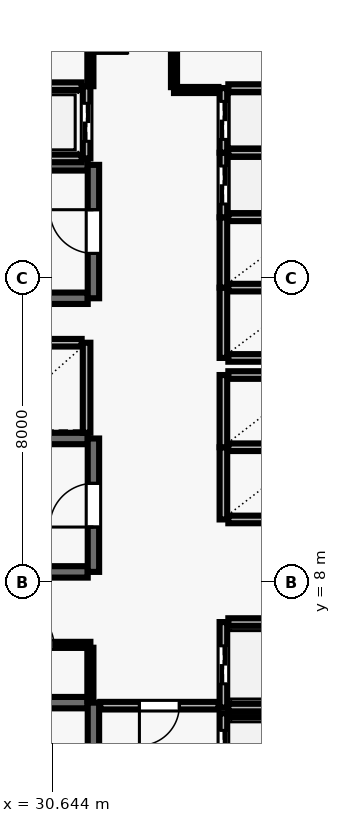
"""IFC4 building model, lengths in metres.
Left out: names, types, materials, properties, quantities, classifications, styles, units other than length and angle.
Written with IfcOpenShell. Run it as: python <this file> out.ifc"""

import sys

from ifc_helpers import new_model, si_unit, direction, frame, frame_2d, origin, place, context, subcontext, project, spatial, rectangle, extrude, element, fill, save


model = new_model("IFC4")
c1 = context("Model", 3, precision=1e-05, world=origin(), true_north=direction((0.0, 1.0)))
c2 = subcontext(c1, "Body", "Model", "MODEL_VIEW")
j1 = project(units=[si_unit("LENGTHUNIT", "METRE"), si_unit("PLANEANGLEUNIT", "RADIAN")], contexts=[c1])
p1 = place(None, origin())
s1 = spatial("IfcSite", under=j1, at=p1, CompositionType="ELEMENT")
p2 = place(p1, origin())
s2 = spatial("IfcBuilding", under=s1, at=p2, CompositionType="ELEMENT")
p3 = place(p2, frame((0.0, 0.0, 142.4)))
s3 = spatial("IfcBuildingStorey", under=s2, at=p3, CompositionType="ELEMENT", Elevation=142.4)
p4 = place(p3, frame((31.58, 4.83, 0.0), z_axis=(0.0, 0.0, 1.0), x_axis=(-1.0, 0.0, 0.0)))
e1 = element("IfcWall", 1, at=p4, inside=s3, PredefinedType="SHEAR", context=c2, shape_type="SweptSolid", body=[
    extrude(rectangle(XDim=8.36, YDim=0.3, at=frame_2d((4.18, 0.0))), origin(), (0.0, 0.0, 1.0), 3.69),
])
p5 = place(p3, frame((31.73, 0.96, 0.0), z_axis=(0.0, 0.0, 1.0), x_axis=(0.0, 1.0, 0.0)))
e2 = element("IfcWall", 2, at=p5, inside=s3, PredefinedType="SHEAR", context=c2, shape_type="SweptSolid", body=[
    extrude(rectangle(XDim=3.87, YDim=0.3, at=frame_2d((1.935, 0.0))), origin(), (0.0, 0.0, 1.0), 3.69),
])
p6 = place(p5, frame((1.54, 0.0, 0.0)))
e3 = element("IfcOpeningElement", 3, at=p6, cuts=e2, PredefinedType="OPENING", context=c2, shape_type="SweptSolid", body=[
    extrude(rectangle(XDim=1.15, YDim=2.15, at=frame_2d((0.575, 1.075))), frame((0.0, 0.16, 0.0), z_axis=(0.0, -1.0, 0.0), x_axis=(1.0, 0.0, 0.0)), (0.0, 0.0, 1.0), 0.32),
])
for number, where, z_axis, x_axis in (
    (4, (31.58, 18.98, 0.0), (0.0, 0.0, 1.0), (-1.0, 0.0, 0.0)),
    (5, (23.22, 15.47, 0.0), (0.0, 0.0, 1.0), (1.0, 0.0, 0.0)),
):
    element("IfcWall", number, at=place(p3, frame(where, z_axis=z_axis, x_axis=x_axis)), inside=s3, PredefinedType="SHEAR", context=c2, shape_type="SweptSolid", body=[
        extrude(rectangle(XDim=8.36, YDim=0.3, at=frame_2d((4.18, 0.0))), origin(), (0.0, 0.0, 1.0), 3.69),
    ])
p7 = place(p3, frame((31.73, 15.47, 0.0), z_axis=(0.0, 0.0, 1.0), x_axis=(0.0, 1.0, 0.0)))
e6 = element("IfcWall", 6, at=p7, inside=s3, PredefinedType="SHEAR", context=c2, shape_type="SweptSolid", body=[
    extrude(rectangle(XDim=3.51, YDim=0.3, at=frame_2d((1.755, 0.0))), origin(), (0.0, 0.0, 1.0), 3.69),
])
p8 = place(p7, frame((1.18, 0.0, 0.0)))
e7 = element("IfcOpeningElement", 7, at=p8, cuts=e6, PredefinedType="OPENING", context=c2, shape_type="SweptSolid", body=[
    extrude(rectangle(XDim=1.15, YDim=2.15, at=frame_2d((0.575, 1.075))), frame((0.0, 0.16, 0.0), z_axis=(0.0, -1.0, 0.0), x_axis=(1.0, 0.0, 0.0)), (0.0, 0.0, 1.0), 0.32),
])
for number, where, z_axis, x_axis in (
    (8, (31.58, 11.78, 0.0), (0.0, 0.0, 1.0), (-1.0, 0.0, 0.0)),
    (9, (23.22, 8.27, 0.0), (0.0, 0.0, 1.0), (1.0, 0.0, 0.0)),
):
    element("IfcWall", number, at=place(p3, frame(where, z_axis=z_axis, x_axis=x_axis)), inside=s3, PredefinedType="SHEAR", context=c2, shape_type="SweptSolid", body=[
        extrude(rectangle(XDim=8.36, YDim=0.3, at=frame_2d((4.18, 0.0))), origin(), (0.0, 0.0, 1.0), 3.69),
    ])
p9 = place(p3, frame((31.73, 8.27, 0.0), z_axis=(0.0, 0.0, 1.0), x_axis=(0.0, 1.0, 0.0)))
e10 = element("IfcWall", 10, at=p9, inside=s3, PredefinedType="SHEAR", context=c2, shape_type="SweptSolid", body=[
    extrude(rectangle(XDim=3.51, YDim=0.3, at=frame_2d((1.755, 0.0))), origin(), (0.0, 0.0, 1.0), 3.69),
])
p10 = place(p9, frame((1.18, 0.0, 0.0)))
e11 = element("IfcOpeningElement", 11, at=p10, cuts=e10, PredefinedType="OPENING", context=c2, shape_type="SweptSolid", body=[
    extrude(rectangle(XDim=1.15, YDim=2.15, at=frame_2d((0.575, 1.075))), frame((0.0, 0.16, 0.0), z_axis=(0.0, -1.0, 0.0), x_axis=(1.0, 0.0, 0.0)), (0.0, 0.0, 1.0), 0.32),
])
p11 = place(p3, frame((35.15, 4.55, 0.0), z_axis=(0.0, 0.0, 1.0), x_axis=(0.0, -1.0, 0.0)))
e12 = element("IfcWall", 12, at=p11, inside=s3, PredefinedType="SOLIDWALL", context=c2, shape_type="SweptSolid", body=[
    extrude(rectangle(XDim=2.1, YDim=0.2, at=frame_2d((1.05, 0.0))), origin(), (0.0, 0.0, 1.0), 3.69),
])
p12 = place(p11, frame((0.45, 0.0, 0.0)))
e13 = element("IfcOpeningElement", 13, at=p12, cuts=e12, PredefinedType="OPENING", context=c2, shape_type="SweptSolid", body=[
    extrude(rectangle(XDim=1.2, YDim=2.15, at=frame_2d((0.6, 1.075))), frame((0.0, 0.11, 0.0), z_axis=(0.0, -1.0, 0.0), x_axis=(1.0, 0.0, 0.0)), (0.0, 0.0, 1.0), 0.22),
])
p13 = place(p3, frame((37.42, 4.55, 0.0), z_axis=(0.0, 0.0, 1.0), x_axis=(-1.0, 0.0, 0.0)))
e14 = element("IfcWall", 14, at=p13, inside=s3, PredefinedType="SOLIDWALL", context=c2, shape_type="SweptSolid", body=[
    extrude(rectangle(XDim=2.14, YDim=0.2, at=frame_2d((1.07, 0.0))), origin(), (0.0, 0.0, 1.0), 3.69),
])
p14 = place(p3, frame((35.15, 6.95, 0.0), z_axis=(0.0, 0.0, 1.0), x_axis=(0.0, -1.0, 0.0)))
e15 = element("IfcWall", 15, at=p14, inside=s3, PredefinedType="SOLIDWALL", context=c2, shape_type="SweptSolid", body=[
    extrude(rectangle(XDim=2.25, YDim=0.2, at=frame_2d((1.125, 0.0))), origin(), (0.0, 0.0, 1.0), 3.69),
])
p15 = place(p14, frame((0.625, 0.0, 0.0)))
e16 = element("IfcOpeningElement", 16, at=p15, cuts=e15, PredefinedType="OPENING", context=c2, shape_type="SweptSolid", body=[
    extrude(rectangle(XDim=1.0, YDim=2.1, at=frame_2d((0.5, 1.05))), frame((0.0, 0.11, 0.0), z_axis=(0.0, -1.0, 0.0), x_axis=(1.0, 0.0, 0.0)), (0.0, 0.0, 1.0), 0.22),
])
for number, where, z_axis, x_axis in (
    (17, (35.28, 4.7, 0.0), (0.0, 0.0, 1.0), (1.0, 0.0, 0.0)),
    (18, (37.42, 6.95, 0.0), (0.0, 0.0, 1.0), (-1.0, 0.0, 0.0)),
):
    element("IfcWall", number, at=place(p3, frame(where, z_axis=z_axis, x_axis=x_axis)), inside=s3, PredefinedType="SOLIDWALL", context=c2, shape_type="SweptSolid", body=[
        extrude(rectangle(XDim=2.14, YDim=0.2, at=frame_2d((1.07, 0.0))), origin(), (0.0, 0.0, 1.0), 3.69),
    ])
p16 = place(p3, frame((35.15, 11.55, 0.0), z_axis=(0.0, 0.0, 1.0), x_axis=(0.0, -1.0, 0.0)))
e19 = element("IfcWall", 19, at=p16, inside=s3, PredefinedType="SOLIDWALL", context=c2, shape_type="SweptSolid", body=[
    extrude(rectangle(XDim=1.9, YDim=0.2, at=frame_2d((0.95, 0.0))), origin(), (0.0, 0.0, 1.0), 3.69),
])
for number, where, z_axis, x_axis in (
    (20, (35.28, 9.65, 0.0), (0.0, 0.0, 1.0), (1.0, 0.0, 0.0)),
    (21, (37.42, 11.55, 0.0), (0.0, 0.0, 1.0), (-1.0, 0.0, 0.0)),
):
    element("IfcWall", number, at=place(p3, frame(where, z_axis=z_axis, x_axis=x_axis)), inside=s3, PredefinedType="SOLIDWALL", context=c2, shape_type="SweptSolid", body=[
        extrude(rectangle(XDim=2.14, YDim=0.2, at=frame_2d((1.07, 0.0))), origin(), (0.0, 0.0, 1.0), 3.69),
    ])
p17 = place(p3, frame((35.15, 13.45, 0.0), z_axis=(0.0, 0.0, 1.0), x_axis=(0.0, -1.0, 0.0)))
e22 = element("IfcWall", 22, at=p17, inside=s3, PredefinedType="SOLIDWALL", context=c2, shape_type="SweptSolid", body=[
    extrude(rectangle(XDim=1.9, YDim=0.2, at=frame_2d((0.95, 0.0))), origin(), (0.0, 0.0, 1.0), 3.69),
])
p18 = place(p3, frame((37.42, 13.45, 0.0), z_axis=(0.0, 0.0, 1.0), x_axis=(-1.0, 0.0, 0.0)))
e23 = element("IfcWall", 23, at=p18, inside=s3, PredefinedType="SOLIDWALL", context=c2, shape_type="SweptSolid", body=[
    extrude(rectangle(XDim=2.14, YDim=0.2, at=frame_2d((1.07, 0.0))), origin(), (0.0, 0.0, 1.0), 3.69),
])
p19 = place(p3, frame((31.55, 11.93, 0.0), z_axis=(0.0, 0.0, 1.0), x_axis=(0.0, 1.0, 0.0)))
e24 = element("IfcWall", 24, at=p19, inside=s3, PredefinedType="SOLIDWALL", context=c2, shape_type="SweptSolid", body=[
    extrude(rectangle(XDim=2.37, YDim=0.2, at=frame_2d((1.185, 0.0))), origin(), (0.0, 0.0, 1.0), 3.69),
])
p20 = place(p3, frame((31.42, 14.3, 0.0), z_axis=(0.0, 0.0, 1.0), x_axis=(-1.0, 0.0, 0.0)))
e25 = element("IfcWall", 25, at=p20, inside=s3, PredefinedType="SOLIDWALL", context=c2, shape_type="SweptSolid", body=[
    extrude(rectangle(XDim=2.44, YDim=0.2, at=frame_2d((1.22, 0.0))), origin(), (0.0, 0.0, 1.0), 3.69),
])
p21 = place(p3, frame((35.15, 15.75, 0.0), z_axis=(0.0, 0.0, 1.0), x_axis=(0.0, -1.0, 0.0)))
e26 = element("IfcWall", 26, at=p21, inside=s3, PredefinedType="SOLIDWALL", context=c2, shape_type="SweptSolid", body=[
    extrude(rectangle(XDim=1.85, YDim=0.2, at=frame_2d((0.925, 0.0))), origin(), (0.0, 0.0, 1.0), 3.69),
])
for number, where, z_axis, x_axis in (
    (27, (35.28, 13.9, 0.0), (0.0, 0.0, 1.0), (1.0, 0.0, 0.0)),
    (28, (37.42, 15.75, 0.0), (0.0, 0.0, 1.0), (-1.0, 0.0, 0.0)),
):
    element("IfcWall", number, at=place(p3, frame(where, z_axis=z_axis, x_axis=x_axis)), inside=s3, PredefinedType="SOLIDWALL", context=c2, shape_type="SweptSolid", body=[
        extrude(rectangle(XDim=2.14, YDim=0.2, at=frame_2d((1.07, 0.0))), origin(), (0.0, 0.0, 1.0), 3.69),
    ])
p22 = place(p3, frame((35.15, 17.6, 0.0), z_axis=(0.0, 0.0, 1.0), x_axis=(0.0, -1.0, 0.0)))
e29 = element("IfcWall", 29, at=p22, inside=s3, PredefinedType="SOLIDWALL", context=c2, shape_type="SweptSolid", body=[
    extrude(rectangle(XDim=1.85, YDim=0.2, at=frame_2d((0.925, 0.0))), origin(), (0.0, 0.0, 1.0), 3.69),
])
p23 = place(p3, frame((37.42, 17.6, 0.0), z_axis=(0.0, 0.0, 1.0), x_axis=(-1.0, 0.0, 0.0)))
e30 = element("IfcWall", 30, at=p23, inside=s3, PredefinedType="SOLIDWALL", context=c2, shape_type="SweptSolid", body=[
    extrude(rectangle(XDim=2.14, YDim=0.2, at=frame_2d((1.07, 0.0))), origin(), (0.0, 0.0, 1.0), 3.69),
])
p24 = place(p3, frame((35.15, 19.3, 0.0), z_axis=(0.0, 0.0, 1.0), x_axis=(0.0, -1.0, 0.0)))
e31 = element("IfcWall", 31, at=p24, inside=s3, PredefinedType="SOLIDWALL", context=c2, shape_type="SweptSolid", body=[
    extrude(rectangle(XDim=1.7, YDim=0.2, at=frame_2d((0.85, 0.0))), origin(), (0.0, 0.0, 1.0), 3.69),
])
p25 = place(p24, frame((0.35, 0.0, 0.0)))
e32 = element("IfcOpeningElement", 32, at=p25, cuts=e31, PredefinedType="OPENING", context=c2, shape_type="SweptSolid", body=[
    extrude(rectangle(XDim=1.0, YDim=2.1, at=frame_2d((0.5, 1.05))), frame((0.0, 0.11, 0.0), z_axis=(0.0, -1.0, 0.0), x_axis=(1.0, 0.0, 0.0)), (0.0, 0.0, 1.0), 0.22),
])
p26 = place(p3, frame((37.42, 19.3, 0.0), z_axis=(0.0, 0.0, 1.0), x_axis=(-1.0, 0.0, 0.0)))
e33 = element("IfcWall", 33, at=p26, inside=s3, PredefinedType="SOLIDWALL", context=c2, shape_type="SweptSolid", body=[
    extrude(rectangle(XDim=2.14, YDim=0.2, at=frame_2d((1.07, 0.0))), origin(), (0.0, 0.0, 1.0), 3.69),
])
p27 = place(p3, frame((35.15, 21.0, 0.0), z_axis=(0.0, 0.0, 1.0), x_axis=(0.0, -1.0, 0.0)))
e34 = element("IfcWall", 34, at=p27, inside=s3, PredefinedType="SOLIDWALL", context=c2, shape_type="SweptSolid", body=[
    extrude(rectangle(XDim=1.7, YDim=0.2, at=frame_2d((0.85, 0.0))), origin(), (0.0, 0.0, 1.0), 3.69),
])
p28 = place(p27, frame((0.35, 0.0, 0.0)))
e35 = element("IfcOpeningElement", 35, at=p28, cuts=e34, PredefinedType="OPENING", context=c2, shape_type="SweptSolid", body=[
    extrude(rectangle(XDim=1.0, YDim=2.1, at=frame_2d((0.5, 1.05))), frame((0.0, 0.11, 0.0), z_axis=(0.0, -1.0, 0.0), x_axis=(1.0, 0.0, 0.0)), (0.0, 0.0, 1.0), 0.22),
])
p29 = place(p3, frame((37.42, 21.0, 0.0), z_axis=(0.0, 0.0, 1.0), x_axis=(-1.0, 0.0, 0.0)))
e36 = element("IfcWall", 36, at=p29, inside=s3, PredefinedType="SOLIDWALL", context=c2, shape_type="SweptSolid", body=[
    extrude(rectangle(XDim=2.14, YDim=0.2, at=frame_2d((1.07, 0.0))), origin(), (0.0, 0.0, 1.0), 3.69),
])
p30 = place(p3, frame((31.55, 19.15, 0.0), z_axis=(0.0, 0.0, 1.0), x_axis=(0.0, 1.0, 0.0)))
e37 = element("IfcWall", 37, at=p30, inside=s3, PredefinedType="SOLIDWALL", context=c2, shape_type="SweptSolid", body=[
    extrude(rectangle(XDim=1.9, YDim=0.2, at=frame_2d((0.95, 0.0))), origin(), (0.0, 0.0, 1.0), 3.69),
])
p31 = place(p30, frame((0.45, 0.0, 0.0)))
e38 = element("IfcOpeningElement", 38, at=p31, cuts=e37, PredefinedType="OPENING", context=c2, shape_type="SweptSolid", body=[
    extrude(rectangle(XDim=1.0, YDim=2.1, at=frame_2d((0.5, 1.05))), frame((0.0, 0.11, 0.0), z_axis=(0.0, -1.0, 0.0), x_axis=(1.0, 0.0, 0.0)), (0.0, 0.0, 1.0), 0.22),
])
for number, where, z_axis, x_axis in (
    (39, (28.98, 19.15, 0.0), (0.0, 0.0, 1.0), (1.0, 0.0, 0.0)),
    (40, (31.42, 21.05, 0.0), (0.0, 0.0, 1.0), (-1.0, 0.0, 0.0)),
):
    element("IfcWall", number, at=place(p3, frame(where, z_axis=z_axis, x_axis=x_axis)), inside=s3, PredefinedType="SOLIDWALL", context=c2, shape_type="SweptSolid", body=[
        extrude(rectangle(XDim=2.44, YDim=0.2, at=frame_2d((1.22, 0.0))), origin(), (0.0, 0.0, 1.0), 3.69),
    ])
p32 = place(p3, frame((28.85, 6.35, 0.0), z_axis=(0.0, 0.0, 1.0), x_axis=(1.0, 0.0, 0.0)))
e41 = element("IfcWall", 41, at=p32, inside=s3, PredefinedType="PARTITIONING", context=c2, shape_type="SweptSolid", body=[
    extrude(rectangle(XDim=2.8, YDim=0.16, at=frame_2d((1.4, 0.0))), origin(), (0.0, 0.0, 1.0), 3.69),
])
p33 = place(p32, frame((0.96, 0.0, 0.0)))
e42 = element("IfcOpeningElement", 42, at=p33, cuts=e41, PredefinedType="OPENING", context=c2, shape_type="SweptSolid", body=[
    extrude(rectangle(XDim=0.88, YDim=2.1, at=frame_2d((0.44, 1.05))), frame((0.0, 0.09, 0.0), z_axis=(0.0, -1.0, 0.0), x_axis=(1.0, 0.0, 0.0)), (0.0, 0.0, 1.0), 0.18),
])
p34 = place(p3, frame((35.02, 4.75, 0.0), z_axis=(0.0, 0.0, 1.0), x_axis=(-1.0, 0.0, 0.0)))
e43 = element("IfcWall", 43, at=p34, inside=s3, PredefinedType="SOLIDWALL", context=c2, shape_type="SweptSolid", body=[
    extrude(rectangle(XDim=3.11, YDim=0.2, at=frame_2d((1.555, 0.0))), origin(), (0.0, 0.0, 1.0), 3.69),
])
p35 = place(p34, frame((1.03, 0.0, 0.0)))
e44 = element("IfcOpeningElement", 44, at=p35, cuts=e43, PredefinedType="OPENING", context=c2, shape_type="SweptSolid", body=[
    extrude(rectangle(XDim=1.05, YDim=2.15, at=frame_2d((0.525, 1.075))), frame((0.0, 0.11, 0.0), z_axis=(0.0, -1.0, 0.0), x_axis=(1.0, 0.0, 0.0)), (0.0, 0.0, 1.0), 0.22),
])
p36 = place(p3, frame((35.02, 20.95, 0.0), z_axis=(0.0, 0.0, 1.0), x_axis=(-1.0, 0.0, 0.0)))
e45 = element("IfcWall", 45, at=p36, inside=s3, PredefinedType="PARTITIONING", context=c2, shape_type="SweptSolid", body=[
    extrude(rectangle(XDim=1.17, YDim=0.16, at=frame_2d((0.585, 0.0))), origin(), (0.0, 0.0, 1.0), 3.69),
])
p37 = place(p3, frame((31.65, 4.86, 0.0), z_axis=(0.0, 0.0, 1.0), x_axis=(0.0, 1.0, 0.0)))
e46 = element("IfcWall", 46, at=p37, inside=s3, PredefinedType="PARTITIONING", context=c2, shape_type="SweptSolid", body=[
    extrude(rectangle(XDim=1.415, YDim=0.16, at=frame_2d((0.708, 0.0))), origin(), (0.0, 0.0, 1.0), 3.69),
])
p38 = place(p3, frame((31.65, 23.775, 0.0), z_axis=(0.0, 0.0, 1.0), x_axis=(0.0, -1.0, 0.0)))
e47 = element("IfcWall", 47, at=p38, inside=s3, PredefinedType="PARTITIONING", context=c2, shape_type="SweptSolid", body=[
    extrude(rectangle(XDim=2.725, YDim=0.16, at=frame_2d((1.362, 0.0))), origin(), (0.0, 0.0, 1.0), 3.69),
])
p39 = place(p38, frame((0.862, 0.0, 0.0)))
e48 = element("IfcOpeningElement", 48, at=p39, cuts=e47, PredefinedType="OPENING", context=c2, shape_type="SweptSolid", body=[
    extrude(rectangle(XDim=1.0, YDim=2.1, at=frame_2d((0.5, 1.05))), frame((0.0, 0.09, 0.0), z_axis=(0.0, -1.0, 0.0), x_axis=(1.0, 0.0, 0.0)), (0.0, 0.0, 1.0), 0.18),
])
p40 = place(p3, frame((33.85, 21.025, 0.0), z_axis=(0.0, 0.0, 1.0), x_axis=(0.0, 1.0, 0.0)))
e49 = element("IfcWall", 49, at=p40, inside=s3, PredefinedType="PARTITIONING", context=c2, shape_type="SweptSolid", body=[
    extrude(rectangle(XDim=2.75, YDim=0.16, at=frame_2d((1.375, 0.0))), origin(), (0.0, 0.0, 1.0), 3.69),
])
p41 = place(p8, origin())
e50 = element("IfcDoor", 50, at=p41, inside=s3, OperationType="SINGLE_SWING_RIGHT", PredefinedType="DOOR", context=c2, shape_type="SweptSolid", body=[
    extrude(rectangle(XDim=1.15, YDim=2.15, at=frame_2d((0.575, 1.075))), frame((0.0, 0.025, 0.0), z_axis=(0.0, -1.0, 0.0), x_axis=(1.0, 0.0, 0.0)), (0.0, 0.0, 1.0), 0.05),
])
fill(e7, e50)
p42 = place(p10, origin())
e51 = element("IfcDoor", 51, at=p42, inside=s3, OperationType="SINGLE_SWING_LEFT", PredefinedType="DOOR", context=c2, shape_type="SweptSolid", body=[
    extrude(rectangle(XDim=1.15, YDim=2.15, at=frame_2d((0.575, 1.075))), frame((0.0, 0.025, 0.0), z_axis=(0.0, -1.0, 0.0), x_axis=(1.0, 0.0, 0.0)), (0.0, 0.0, 1.0), 0.05),
])
fill(e11, e51)
p43 = place(p12, origin())
e52 = element("IfcDoor", 52, at=p43, inside=s3, OperationType="DOUBLE_DOOR_SLIDING", PredefinedType="DOOR", context=c2, shape_type="SweptSolid", body=[
    extrude(rectangle(XDim=1.2, YDim=2.15, at=frame_2d((0.6, 1.075))), frame((0.0, 0.025, 0.0), z_axis=(0.0, -1.0, 0.0), x_axis=(1.0, 0.0, 0.0)), (0.0, 0.0, 1.0), 0.05),
])
fill(e13, e52)
p44 = place(p15, origin())
e53 = element("IfcDoor", 53, at=p44, inside=s3, OperationType="DOUBLE_DOOR_SLIDING", PredefinedType="DOOR", context=c2, shape_type="SweptSolid", body=[
    extrude(rectangle(XDim=1.0, YDim=2.1, at=frame_2d((0.5, 1.05))), frame((0.0, 0.025, 0.0), z_axis=(0.0, -1.0, 0.0), x_axis=(1.0, 0.0, 0.0)), (0.0, 0.0, 1.0), 0.05),
])
fill(e16, e53)
p45 = place(p25, origin())
e54 = element("IfcDoor", 54, at=p45, inside=s3, OperationType="DOUBLE_DOOR_SLIDING", PredefinedType="DOOR", context=c2, shape_type="SweptSolid", body=[
    extrude(rectangle(XDim=1.0, YDim=2.1, at=frame_2d((0.5, 1.05))), frame((0.0, 0.025, 0.0), z_axis=(0.0, -1.0, 0.0), x_axis=(1.0, 0.0, 0.0)), (0.0, 0.0, 1.0), 0.05),
])
fill(e32, e54)
p46 = place(p28, origin())
e55 = element("IfcDoor", 55, at=p46, inside=s3, OperationType="DOUBLE_DOOR_SLIDING", PredefinedType="DOOR", context=c2, shape_type="SweptSolid", body=[
    extrude(rectangle(XDim=1.0, YDim=2.1, at=frame_2d((0.5, 1.05))), frame((0.0, 0.025, 0.0), z_axis=(0.0, -1.0, 0.0), x_axis=(1.0, 0.0, 0.0)), (0.0, 0.0, 1.0), 0.05),
])
fill(e35, e55)
p47 = place(p31, origin())
e56 = element("IfcDoor", 56, at=p47, inside=s3, OperationType="DOUBLE_DOOR_SLIDING", PredefinedType="DOOR", context=c2, shape_type="SweptSolid", body=[
    extrude(rectangle(XDim=1.0, YDim=2.1, at=frame_2d((0.5, 1.05))), frame((0.0, 0.025, 0.0), z_axis=(0.0, -1.0, 0.0), x_axis=(1.0, 0.0, 0.0)), (0.0, 0.0, 1.0), 0.05),
])
fill(e38, e56)
p48 = place(p35, origin())
e57 = element("IfcDoor", 57, at=p48, inside=s3, OperationType="SINGLE_SWING_RIGHT", PredefinedType="DOOR", context=c2, shape_type="SweptSolid", body=[
    extrude(rectangle(XDim=1.05, YDim=2.15, at=frame_2d((0.525, 1.075))), frame((0.0, 0.025, 0.0), z_axis=(0.0, -1.0, 0.0), x_axis=(1.0, 0.0, 0.0)), (0.0, 0.0, 1.0), 0.05),
])
fill(e44, e57)
p49 = place(p39, origin())
e58 = element("IfcDoor", 58, at=p49, inside=s3, OperationType="SINGLE_SWING_RIGHT", PredefinedType="DOOR", context=c2, shape_type="SweptSolid", body=[
    extrude(rectangle(XDim=1.0, YDim=2.1, at=frame_2d((0.5, 1.05))), frame((0.0, 0.025, 0.0), z_axis=(0.0, -1.0, 0.0), x_axis=(1.0, 0.0, 0.0)), (0.0, 0.0, 1.0), 0.05),
])
fill(e48, e58)
p50 = place(p33, origin())
e59 = element("IfcDoor", 59, at=p50, inside=s3, OperationType="SINGLE_SWING_LEFT", PredefinedType="DOOR", context=c2, shape_type="SweptSolid", body=[
    extrude(rectangle(XDim=0.88, YDim=2.1, at=frame_2d((0.44, 1.05))), frame((0.0, 0.025, 0.0), z_axis=(0.0, -1.0, 0.0), x_axis=(1.0, 0.0, 0.0)), (0.0, 0.0, 1.0), 0.05),
])
fill(e42, e59)
save(model, sys.argv[1])
